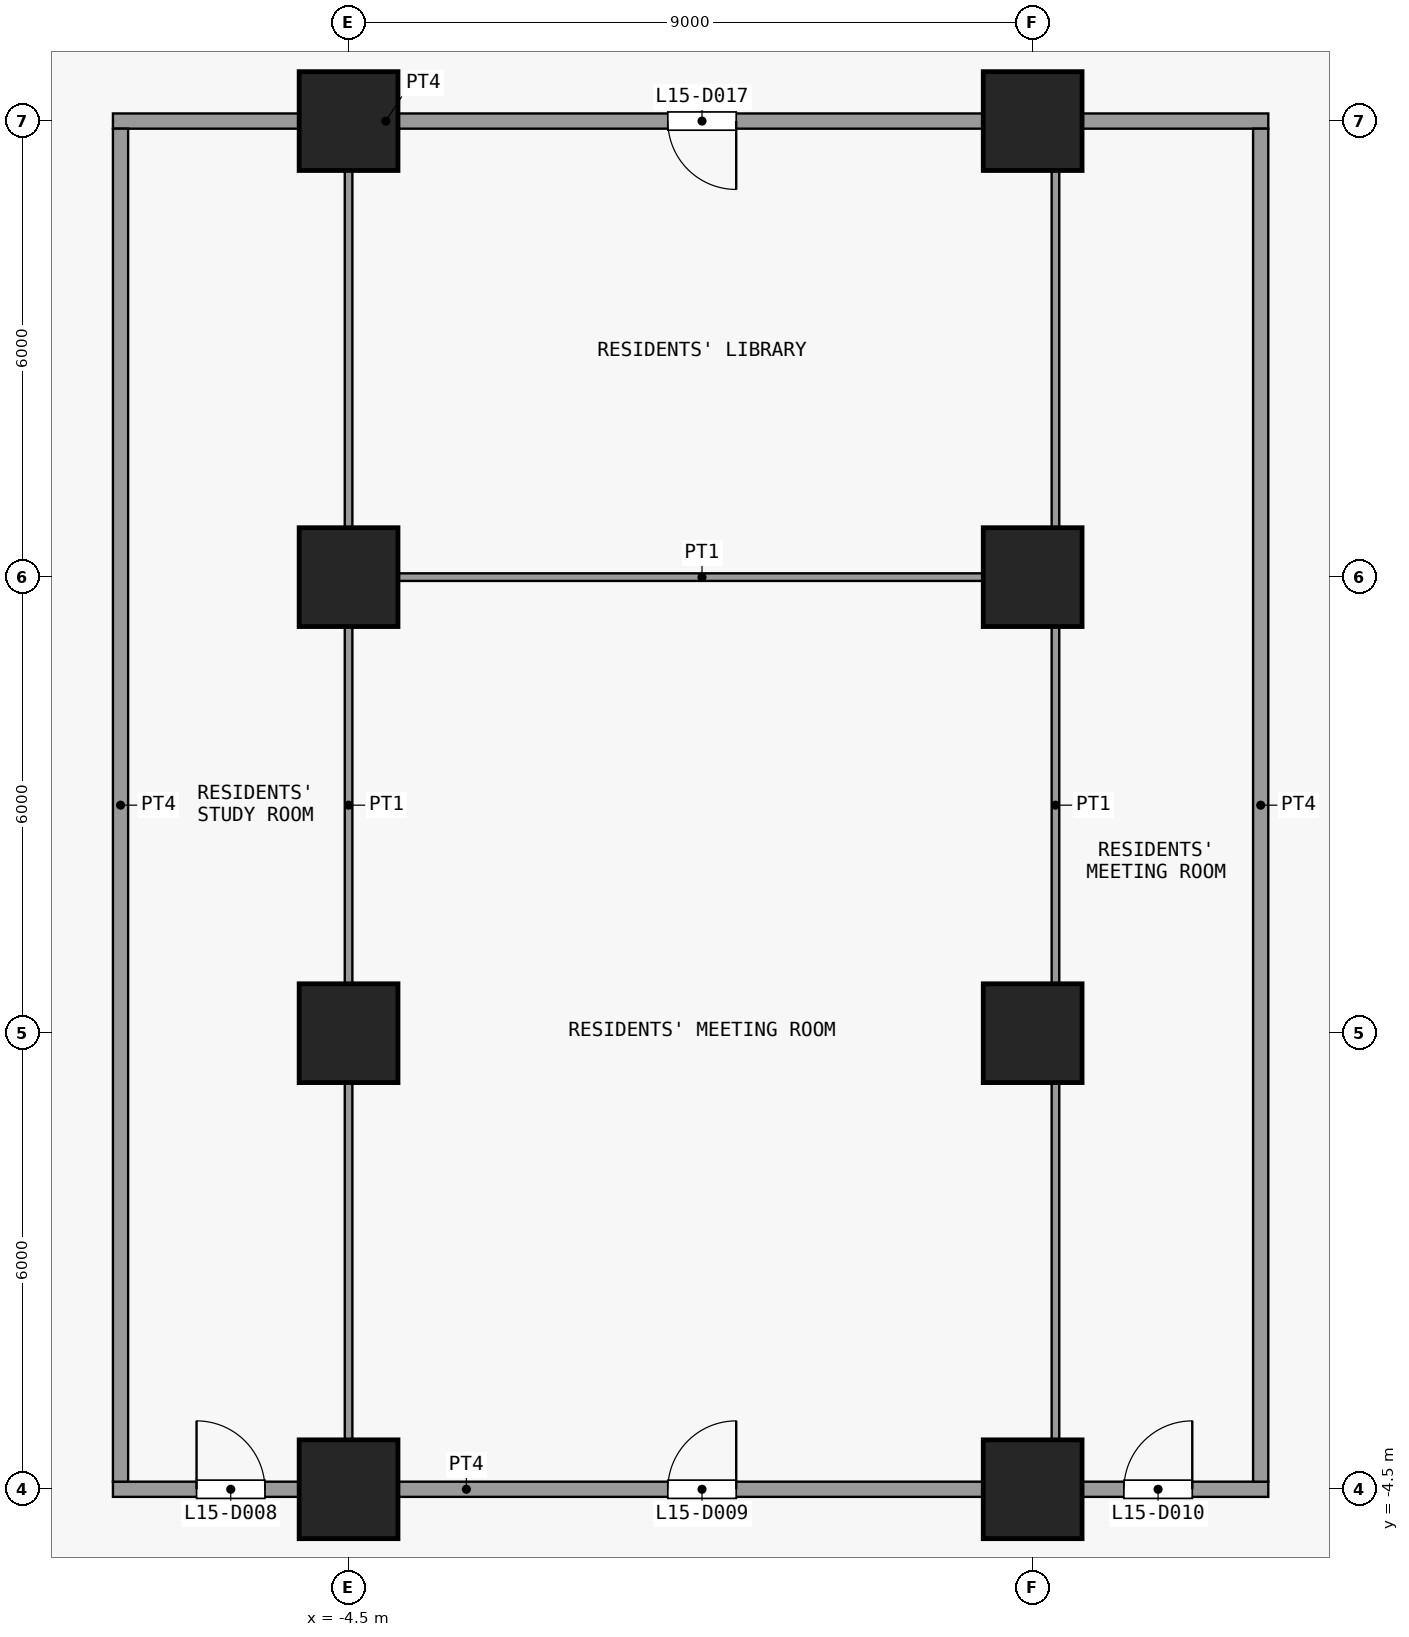
"""IFC4 building model, lengths in metres.
Left out: names, types, materials, properties, quantities, classifications, styles, units other than length and angle.
Written with IfcOpenShell. Run it as: python <this file> out.ifc"""

import sys

from ifc_helpers import new_model, si_unit, direction, frame, frame_2d, origin, origin_2d, place, context, subcontext, project, spatial, rectangle, extrude, element, fill, save


model = new_model("IFC4")
c1 = context("Model", 3, precision=1e-05, world=origin(), true_north=direction((0.0, 1.0)))
c2 = subcontext(c1, "Body", "Model", "MODEL_VIEW")
j1 = project(units=[si_unit("LENGTHUNIT", "METRE"), si_unit("PLANEANGLEUNIT", "RADIAN")], contexts=[c1])
p1 = place(None, origin())
s1 = spatial("IfcSite", under=j1, at=p1, CompositionType="ELEMENT")
p2 = place(p1, origin())
s2 = spatial("IfcBuilding", under=s1, at=p2, CompositionType="ELEMENT")
p3 = place(p2, frame((0.0, 0.0, 64.9)))
s3 = spatial("IfcBuildingStorey", under=s2, at=p3, CompositionType="ELEMENT", Elevation=64.9)
for number, where, z_axis, x_axis in (
    (1, (-4.5, -4.5, 0.0), (0.0, 0.0, 1.0), (1.0, 0.0, 0.0)),
    (2, (-4.5, 1.5, 0.0), (0.0, 0.0, 1.0), (1.0, 0.0, 0.0)),
    (3, (-4.5, 7.5, 0.0), (0.0, 0.0, 1.0), (1.0, 0.0, 0.0)),
    (4, (-4.5, 13.5, 0.0), (0.0, 0.0, 1.0), (1.0, 0.0, 0.0)),
    (5, (4.5, -4.5, 0.0), (0.0, 0.0, 1.0), (1.0, 0.0, 0.0)),
    (6, (4.5, 1.5, 0.0), (0.0, 0.0, 1.0), (1.0, 0.0, 0.0)),
    (7, (4.5, 7.5, 0.0), (0.0, 0.0, 1.0), (1.0, 0.0, 0.0)),
    (8, (4.5, 13.5, 0.0), (0.0, 0.0, 1.0), (1.0, 0.0, 0.0)),
):
    element("IfcColumn", number, at=place(p3, frame(where, z_axis=z_axis, x_axis=x_axis)), inside=s3, PredefinedType="COLUMN", context=c2, shape_type="SweptSolid", body=[
        extrude(rectangle(XDim=1.3, YDim=1.3, at=origin_2d()), origin(), (0.0, 0.0, 1.0), 3.6),
    ])
p4 = place(p3, frame((-7.6, -4.5, 0.0), z_axis=(0.0, 0.0, 1.0), x_axis=(1.0, 0.0, 0.0)))
e9 = element("IfcWall", 9, at=p4, inside=s3, PredefinedType="PARTITIONING", context=c2, shape_type="SweptSolid", body=[
    extrude(rectangle(XDim=15.2, YDim=0.2, at=frame_2d((7.6, 0.0))), origin(), (0.0, 0.0, 1.0), 3.3),
])
p5 = place(p4, frame((1.1, 0.0, 0.0)))
e10 = element("IfcOpeningElement", 10, at=p5, cuts=e9, PredefinedType="OPENING", context=c2, shape_type="SweptSolid", body=[
    extrude(rectangle(XDim=0.9, YDim=2.1, at=frame_2d((0.45, 1.05))), frame((0.0, 0.11, 0.0), z_axis=(0.0, -1.0, 0.0), x_axis=(1.0, 0.0, 0.0)), (0.0, 0.0, 1.0), 0.22),
])
p6 = place(p4, frame((7.3, 0.0, 0.0)))
e11 = element("IfcOpeningElement", 11, at=p6, cuts=e9, PredefinedType="OPENING", context=c2, shape_type="SweptSolid", body=[
    extrude(rectangle(XDim=0.9, YDim=2.1, at=frame_2d((0.45, 1.05))), frame((0.0, 0.11, 0.0), z_axis=(0.0, -1.0, 0.0), x_axis=(1.0, 0.0, 0.0)), (0.0, 0.0, 1.0), 0.22),
])
p7 = place(p4, frame((13.3, 0.0, 0.0)))
e12 = element("IfcOpeningElement", 12, at=p7, cuts=e9, PredefinedType="OPENING", context=c2, shape_type="SweptSolid", body=[
    extrude(rectangle(XDim=0.9, YDim=2.1, at=frame_2d((0.45, 1.05))), frame((0.0, 0.11, 0.0), z_axis=(0.0, -1.0, 0.0), x_axis=(1.0, 0.0, 0.0)), (0.0, 0.0, 1.0), 0.22),
])
p8 = place(p3, frame((-4.45, 7.5, 0.0), z_axis=(0.0, 0.0, 1.0), x_axis=(1.0, 0.0, 0.0)))
e13 = element("IfcWall", 13, at=p8, inside=s3, PredefinedType="PARTITIONING", context=c2, shape_type="SweptSolid", body=[
    extrude(rectangle(XDim=9.2, YDim=0.1, at=frame_2d((4.6, 0.0))), origin(), (0.0, 0.0, 1.0), 3.3),
])
p9 = place(p3, frame((-7.6, 13.5, 0.0), z_axis=(0.0, 0.0, 1.0), x_axis=(1.0, 0.0, 0.0)))
e14 = element("IfcWall", 14, at=p9, inside=s3, PredefinedType="PARTITIONING", context=c2, shape_type="SweptSolid", body=[
    extrude(rectangle(XDim=15.2, YDim=0.2, at=frame_2d((7.6, 0.0))), origin(), (0.0, 0.0, 1.0), 3.3),
])
p10 = place(p9, frame((7.3, 0.0, 0.0)))
e15 = element("IfcOpeningElement", 15, at=p10, cuts=e14, PredefinedType="OPENING", context=c2, shape_type="SweptSolid", body=[
    extrude(rectangle(XDim=0.9, YDim=2.1, at=frame_2d((0.45, 1.05))), frame((0.0, 0.11, 0.0), z_axis=(0.0, -1.0, 0.0), x_axis=(1.0, 0.0, 0.0)), (0.0, 0.0, 1.0), 0.22),
])
p11 = place(p3, frame((-7.5, -4.4, 0.0), z_axis=(0.0, 0.0, 1.0), x_axis=(0.0, 1.0, 0.0)))
e16 = element("IfcWall", 16, at=p11, inside=s3, PredefinedType="PARTITIONING", context=c2, shape_type="SweptSolid", body=[
    extrude(rectangle(XDim=17.8, YDim=0.2, at=frame_2d((8.9, 0.0))), origin(), (0.0, 0.0, 1.0), 3.3),
])
for number, where, z_axis, x_axis in (
    (17, (-4.5, -4.4, 0.0), (0.0, 0.0, 1.0), (0.0, 1.0, 0.0)),
    (18, (4.8, -4.4, 0.0), (0.0, 0.0, 1.0), (0.0, 1.0, 0.0)),
):
    element("IfcWall", number, at=place(p3, frame(where, z_axis=z_axis, x_axis=x_axis)), inside=s3, PredefinedType="PARTITIONING", context=c2, shape_type="SweptSolid", body=[
        extrude(rectangle(XDim=17.8, YDim=0.1, at=frame_2d((8.9, 0.0))), origin(), (0.0, 0.0, 1.0), 3.3),
    ])
p12 = place(p3, frame((7.5, -4.4, 0.0), z_axis=(0.0, 0.0, 1.0), x_axis=(0.0, 1.0, 0.0)))
e19 = element("IfcWall", 19, at=p12, inside=s3, PredefinedType="PARTITIONING", context=c2, shape_type="SweptSolid", body=[
    extrude(rectangle(XDim=17.8, YDim=0.2, at=frame_2d((8.9, 0.0))), origin(), (0.0, 0.0, 1.0), 3.3),
])
p13 = place(p5, origin())
e20 = element("IfcDoor", 20, at=p13, inside=s3, OperationType="SINGLE_SWING_RIGHT", PredefinedType="DOOR", context=c2, shape_type="SweptSolid", body=[
    extrude(rectangle(XDim=0.9, YDim=2.1, at=frame_2d((0.45, 1.05))), frame((0.0, 0.025, 0.0), z_axis=(0.0, -1.0, 0.0), x_axis=(1.0, 0.0, 0.0)), (0.0, 0.0, 1.0), 0.05),
])
fill(e10, e20)
p14 = place(p6, origin())
e21 = element("IfcDoor", 21, at=p14, inside=s3, OperationType="SINGLE_SWING_LEFT", PredefinedType="DOOR", context=c2, shape_type="SweptSolid", body=[
    extrude(rectangle(XDim=0.9, YDim=2.1, at=frame_2d((0.45, 1.05))), frame((0.0, 0.025, 0.0), z_axis=(0.0, -1.0, 0.0), x_axis=(1.0, 0.0, 0.0)), (0.0, 0.0, 1.0), 0.05),
])
fill(e11, e21)
p15 = place(p7, origin())
e22 = element("IfcDoor", 22, at=p15, inside=s3, OperationType="SINGLE_SWING_LEFT", PredefinedType="DOOR", context=c2, shape_type="SweptSolid", body=[
    extrude(rectangle(XDim=0.9, YDim=2.1, at=frame_2d((0.45, 1.05))), frame((0.0, 0.025, 0.0), z_axis=(0.0, -1.0, 0.0), x_axis=(1.0, 0.0, 0.0)), (0.0, 0.0, 1.0), 0.05),
])
fill(e12, e22)
p16 = place(p10, origin())
e23 = element("IfcDoor", 23, at=p16, inside=s3, OperationType="SINGLE_SWING_RIGHT", PredefinedType="DOOR", context=c2, shape_type="SweptSolid", body=[
    extrude(rectangle(XDim=0.9, YDim=2.1, at=frame_2d((0.45, 1.05))), frame((0.0, 0.025, 0.0), z_axis=(0.0, -1.0, 0.0), x_axis=(1.0, 0.0, 0.0)), (0.0, 0.0, 1.0), 0.05),
])
fill(e15, e23)
save(model, sys.argv[1])
